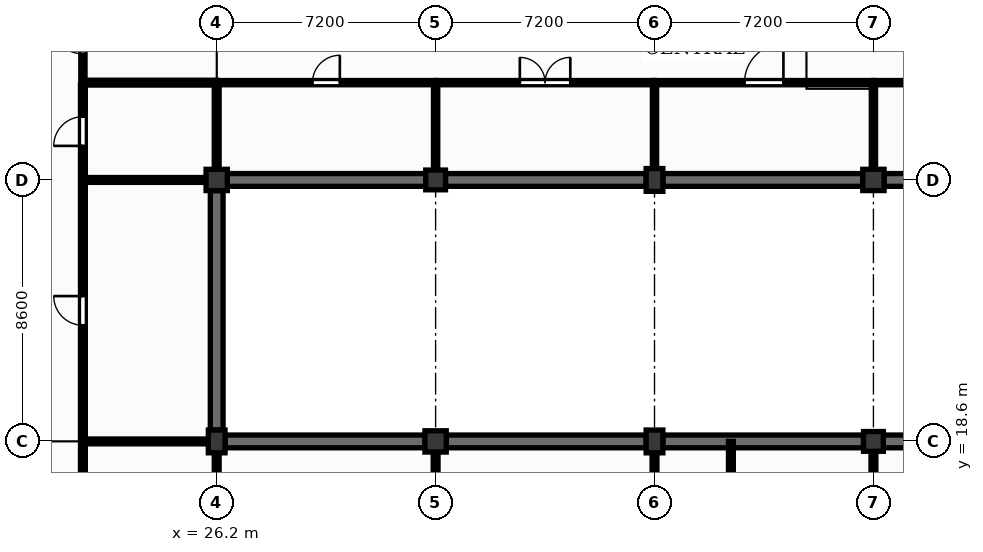
"""IFC4 building model, lengths in metres.
Left out: names, types, materials, properties, quantities, classifications, styles, units other than length and angle.
Written with IfcOpenShell. Run it as: python <this file> out.ifc"""

import sys

from ifc_helpers import new_model, si_unit, direction, frame, frame_2d, origin, origin_2d, place, context, subcontext, project, spatial, rectangle, extrude, element, fill, save


model = new_model("IFC4")
c1 = context("Model", 3, precision=1e-05, world=origin(), true_north=direction((0.0, 1.0)))
c2 = subcontext(c1, "Body", "Model", "MODEL_VIEW")
j1 = project(units=[si_unit("LENGTHUNIT", "METRE"), si_unit("PLANEANGLEUNIT", "RADIAN")], contexts=[c1])
p1 = place(None, origin())
s1 = spatial("IfcSite", under=j1, at=p1, CompositionType="ELEMENT")
p2 = place(p1, origin())
s2 = spatial("IfcBuilding", under=s1, at=p2, CompositionType="ELEMENT")
p3 = place(p2, frame((0.0, 0.0, -4.5)))
s3 = spatial("IfcBuildingStorey", under=s2, at=p3, CompositionType="ELEMENT", Elevation=-4.5)
p4 = place(p3, frame((26.2, 18.6, 0.0), z_axis=(0.0, 0.0, 1.0), x_axis=(1.0, 0.0, 0.0)))
e1 = element("IfcColumn", 1, at=p4, inside=s3, PredefinedType="COLUMN", context=c2, shape_type="SweptSolid", body=[
    extrude(rectangle(XDim=0.55, YDim=0.75, at=origin_2d()), origin(), (0.0, 0.0, 1.0), 4.2),
])
for number, where, z_axis, x_axis in (
    (2, (26.2, 27.2, 0.0), (0.0, 0.0, 1.0), (1.0, 0.0, 0.0)),
    (3, (33.4, 18.6, 0.0), (0.0, 0.0, 1.0), (1.0, 0.0, 0.0)),
):
    element("IfcColumn", number, at=place(p3, frame(where, z_axis=z_axis, x_axis=x_axis)), inside=s3, PredefinedType="COLUMN", context=c2, shape_type="SweptSolid", body=[
        extrude(rectangle(XDim=0.7, YDim=0.7, at=origin_2d()), origin(), (0.0, 0.0, 1.0), 4.2),
    ])
p5 = place(p3, frame((33.4, 27.2, 0.0), z_axis=(0.0, 0.0, 1.0), x_axis=(1.0, 0.0, 0.0)))
e4 = element("IfcColumn", 4, at=p5, inside=s3, PredefinedType="COLUMN", context=c2, shape_type="SweptSolid", body=[
    extrude(rectangle(XDim=0.65, YDim=0.65, at=origin_2d()), origin(), (0.0, 0.0, 1.0), 4.2),
])
for number, where, z_axis, x_axis in (
    (5, (40.6, 18.6, 0.0), (0.0, 0.0, 1.0), (1.0, 0.0, 0.0)),
    (6, (40.6, 27.2, 0.0), (0.0, 0.0, 1.0), (1.0, 0.0, 0.0)),
):
    element("IfcColumn", number, at=place(p3, frame(where, z_axis=z_axis, x_axis=x_axis)), inside=s3, PredefinedType="COLUMN", context=c2, shape_type="SweptSolid", body=[
        extrude(rectangle(XDim=0.55, YDim=0.75, at=origin_2d()), origin(), (0.0, 0.0, 1.0), 4.2),
    ])
p6 = place(p3, frame((47.8, 18.6, 0.0), z_axis=(0.0, 0.0, 1.0), x_axis=(1.0, 0.0, 0.0)))
e7 = element("IfcColumn", 7, at=p6, inside=s3, PredefinedType="COLUMN", context=c2, shape_type="SweptSolid", body=[
    extrude(rectangle(XDim=0.65, YDim=0.65, at=origin_2d()), origin(), (0.0, 0.0, 1.0), 4.2),
])
p7 = place(p3, frame((47.8, 27.2, 0.0), z_axis=(0.0, 0.0, 1.0), x_axis=(1.0, 0.0, 0.0)))
e8 = element("IfcColumn", 8, at=p7, inside=s3, PredefinedType="COLUMN", context=c2, shape_type="SweptSolid", body=[
    extrude(rectangle(XDim=0.7, YDim=0.7, at=origin_2d()), origin(), (0.0, 0.0, 1.0), 4.2),
])
p8 = place(p3, frame((26.2, 18.975, 0.0), z_axis=(0.0, 0.0, 1.0), x_axis=(0.0, 1.0, 0.0)))
e9 = element("IfcWall", 9, at=p8, inside=s3, PredefinedType="USERDEFINED", context=c2, shape_type="SweptSolid", body=[
    extrude(rectangle(XDim=7.875, YDim=0.42, at=frame_2d((3.938, 0.0))), origin(), (0.0, 0.0, 1.0), 4.2),
])
p9 = place(p3, frame((26.475, 18.6, 0.0), z_axis=(0.0, 0.0, 1.0), x_axis=(1.0, 0.0, 0.0)))
e10 = element("IfcWall", 10, at=p9, inside=s3, PredefinedType="USERDEFINED", context=c2, shape_type="SweptSolid", body=[
    extrude(rectangle(XDim=6.575, YDim=0.42, at=frame_2d((3.288, 0.0))), origin(), (0.0, 0.0, 1.0), 4.2),
])
p10 = place(p3, frame((26.55, 27.2, 0.0), z_axis=(0.0, 0.0, 1.0), x_axis=(1.0, 0.0, 0.0)))
e11 = element("IfcWall", 11, at=p10, inside=s3, PredefinedType="USERDEFINED", context=c2, shape_type="SweptSolid", body=[
    extrude(rectangle(XDim=6.525, YDim=0.42, at=frame_2d((3.262, 0.0))), origin(), (0.0, 0.0, 1.0), 4.2),
])
p11 = place(p3, frame((33.75, 18.6, 0.0), z_axis=(0.0, 0.0, 1.0), x_axis=(1.0, 0.0, 0.0)))
e12 = element("IfcWall", 12, at=p11, inside=s3, PredefinedType="USERDEFINED", context=c2, shape_type="SweptSolid", body=[
    extrude(rectangle(XDim=6.575, YDim=0.42, at=frame_2d((3.288, 0.0))), origin(), (0.0, 0.0, 1.0), 4.2),
])
p12 = place(p3, frame((33.725, 27.2, 0.0), z_axis=(0.0, 0.0, 1.0), x_axis=(1.0, 0.0, 0.0)))
e13 = element("IfcWall", 13, at=p12, inside=s3, PredefinedType="USERDEFINED", context=c2, shape_type="SweptSolid", body=[
    extrude(rectangle(XDim=6.6, YDim=0.42, at=frame_2d((3.3, 0.0))), origin(), (0.0, 0.0, 1.0), 4.2),
])
p13 = place(p3, frame((40.875, 18.6, 0.0), z_axis=(0.0, 0.0, 1.0), x_axis=(1.0, 0.0, 0.0)))
e14 = element("IfcWall", 14, at=p13, inside=s3, PredefinedType="USERDEFINED", context=c2, shape_type="SweptSolid", body=[
    extrude(rectangle(XDim=6.6, YDim=0.42, at=frame_2d((3.3, 0.0))), origin(), (0.0, 0.0, 1.0), 4.2),
])
p14 = place(p3, frame((40.875, 27.2, 0.0), z_axis=(0.0, 0.0, 1.0), x_axis=(1.0, 0.0, 0.0)))
e15 = element("IfcWall", 15, at=p14, inside=s3, PredefinedType="USERDEFINED", context=c2, shape_type="SweptSolid", body=[
    extrude(rectangle(XDim=6.575, YDim=0.42, at=frame_2d((3.288, 0.0))), origin(), (0.0, 0.0, 1.0), 4.2),
])
p15 = place(p3, frame((48.125, 18.6, 0.0), z_axis=(0.0, 0.0, 1.0), x_axis=(1.0, 0.0, 0.0)))
e16 = element("IfcWall", 16, at=p15, inside=s3, PredefinedType="USERDEFINED", context=c2, shape_type="SweptSolid", body=[
    extrude(rectangle(XDim=6.525, YDim=0.42, at=frame_2d((3.262, 0.0))), origin(), (0.0, 0.0, 1.0), 4.2),
])
p16 = place(p3, frame((48.15, 27.2, 0.0), z_axis=(0.0, 0.0, 1.0), x_axis=(1.0, 0.0, 0.0)))
e17 = element("IfcWall", 17, at=p16, inside=s3, PredefinedType="USERDEFINED", context=c2, shape_type="SweptSolid", body=[
    extrude(rectangle(XDim=6.575, YDim=0.42, at=frame_2d((3.288, 0.0))), origin(), (0.0, 0.0, 1.0), 4.2),
])
p17 = place(p3, frame((21.8, 13.47, 0.0), z_axis=(0.0, 0.0, 1.0), x_axis=(0.0, 1.0, 0.0)))
e18 = element("IfcWall", 18, at=p17, inside=s3, PredefinedType="PARTITIONING", context=c2, shape_type="SweptSolid", body=[
    extrude(rectangle(XDim=5.06, YDim=0.16, at=frame_2d((2.53, 0.0))), origin(), (0.0, 0.0, 1.0), 4.08),
])
p18 = place(p17, frame((2.05, 0.0, 0.0)))
e19 = element("IfcOpeningElement", 19, at=p18, cuts=e18, PredefinedType="OPENING", context=c2, shape_type="SweptSolid", body=[
    extrude(rectangle(XDim=0.96, YDim=2.1, at=frame_2d((0.48, 1.05))), frame((0.0, 0.09, 0.0), z_axis=(0.0, -1.0, 0.0), x_axis=(1.0, 0.0, 0.0)), (0.0, 0.0, 1.0), 0.18),
])
p19 = place(p3, frame((21.8, 18.67, 0.0), z_axis=(0.0, 0.0, 1.0), x_axis=(0.0, 1.0, 0.0)))
e20 = element("IfcWall", 20, at=p19, inside=s3, PredefinedType="PARTITIONING", context=c2, shape_type="SweptSolid", body=[
    extrude(rectangle(XDim=8.46, YDim=0.16, at=frame_2d((4.23, 0.0))), origin(), (0.0, 0.0, 1.0), 4.08),
])
p20 = place(p19, frame((3.75, 0.0, 0.0)))
e21 = element("IfcOpeningElement", 21, at=p20, cuts=e20, PredefinedType="OPENING", context=c2, shape_type="SweptSolid", body=[
    extrude(rectangle(XDim=0.96, YDim=2.1, at=frame_2d((0.48, 1.05))), frame((0.0, 0.09, 0.0), z_axis=(0.0, -1.0, 0.0), x_axis=(1.0, 0.0, 0.0)), (0.0, 0.0, 1.0), 0.18),
])
p21 = place(p3, frame((21.8, 18.6, 0.0), z_axis=(0.0, 0.0, 1.0), x_axis=(1.0, 0.0, 0.0)))
e22 = element("IfcWall", 22, at=p21, inside=s3, PredefinedType="PARTITIONING", context=c2, shape_type="SweptSolid", body=[
    extrude(rectangle(XDim=4.125, YDim=0.16, at=frame_2d((2.062, 0.0))), origin(), (0.0, 0.0, 1.0), 3.5),
])
p22 = place(p3, frame((21.8, 27.27, 0.0), z_axis=(0.0, 0.0, 1.0), x_axis=(0.0, 1.0, 0.0)))
e23 = element("IfcWall", 23, at=p22, inside=s3, PredefinedType="PARTITIONING", context=c2, shape_type="SweptSolid", body=[
    extrude(rectangle(XDim=3.06, YDim=0.16, at=frame_2d((1.53, 0.0))), origin(), (0.0, 0.0, 1.0), 4.08),
])
p23 = place(p22, frame((1.05, 0.0, 0.0)))
e24 = element("IfcOpeningElement", 24, at=p23, cuts=e23, PredefinedType="OPENING", context=c2, shape_type="SweptSolid", body=[
    extrude(rectangle(XDim=0.96, YDim=2.1, at=frame_2d((0.48, 1.05))), frame((0.0, 0.09, 0.0), z_axis=(0.0, -1.0, 0.0), x_axis=(1.0, 0.0, 0.0)), (0.0, 0.0, 1.0), 0.18),
])
p24 = place(p3, frame((21.8, 27.2, 0.0), z_axis=(0.0, 0.0, 1.0), x_axis=(1.0, 0.0, 0.0)))
e25 = element("IfcWall", 25, at=p24, inside=s3, PredefinedType="PARTITIONING", context=c2, shape_type="SweptSolid", body=[
    extrude(rectangle(XDim=4.05, YDim=0.16, at=frame_2d((2.025, 0.0))), origin(), (0.0, 0.0, 1.0), 3.6),
])
p25 = place(p3, frame((21.8, 30.47, 0.0), z_axis=(0.0, 0.0, 1.0), x_axis=(0.0, 1.0, 0.0)))
e26 = element("IfcWall", 26, at=p25, inside=s3, PredefinedType="PARTITIONING", context=c2, shape_type="SweptSolid", body=[
    extrude(rectangle(XDim=2.86, YDim=0.14, at=frame_2d((1.43, 0.0))), origin(), (0.0, 0.0, 1.0), 4.08),
])
p26 = place(p25, frame((0.88, 0.0, 0.0)))
e27 = element("IfcOpeningElement", 27, at=p26, cuts=e26, PredefinedType="OPENING", context=c2, shape_type="SweptSolid", body=[
    extrude(rectangle(XDim=1.1, YDim=2.1, at=frame_2d((0.55, 1.05))), frame((0.0, 0.08, 0.0), z_axis=(0.0, -1.0, 0.0), x_axis=(1.0, 0.0, 0.0)), (0.0, 0.0, 1.0), 0.16),
])
p27 = place(p3, frame((21.8, 30.4, 0.0), z_axis=(0.0, 0.0, 1.0), x_axis=(1.0, 0.0, 0.0)))
e28 = element("IfcWall", 28, at=p27, inside=s3, PredefinedType="PARTITIONING", context=c2, shape_type="SweptSolid", body=[
    extrude(rectangle(XDim=4.4, YDim=0.16, at=frame_2d((2.2, 0.0))), origin(), (0.0, 0.0, 1.0), 4.08),
])
p28 = place(p3, frame((26.2, 13.47, 0.0), z_axis=(0.0, 0.0, 1.0), x_axis=(0.0, 1.0, 0.0)))
e29 = element("IfcWall", 29, at=p28, inside=s3, PredefinedType="PARTITIONING", context=c2, shape_type="SweptSolid", body=[
    extrude(rectangle(XDim=4.755, YDim=0.16, at=frame_2d((2.377, 0.0))), origin(), (0.0, 0.0, 1.0), 3.5),
])
p29 = place(p3, frame((26.2, 27.55, 0.0), z_axis=(0.0, 0.0, 1.0), x_axis=(0.0, 1.0, 0.0)))
e30 = element("IfcWall", 30, at=p29, inside=s3, PredefinedType="PARTITIONING", context=c2, shape_type="SweptSolid", body=[
    extrude(rectangle(XDim=2.78, YDim=0.16, at=frame_2d((1.39, 0.0))), origin(), (0.0, 0.0, 1.0), 3.4),
])
p30 = place(p3, frame((26.2, 30.4, 0.0), z_axis=(0.0, 0.0, 1.0), x_axis=(1.0, 0.0, 0.0)))
e31 = element("IfcWall", 31, at=p30, inside=s3, PredefinedType="PARTITIONING", context=c2, shape_type="SweptSolid", body=[
    extrude(rectangle(XDim=7.2, YDim=0.14, at=frame_2d((3.6, 0.0))), origin(), (0.0, 0.0, 1.0), 4.08),
])
p31 = place(p30, frame((3.15, 0.0, 0.0)))
e32 = element("IfcOpeningElement", 32, at=p31, cuts=e31, PredefinedType="OPENING", context=c2, shape_type="SweptSolid", body=[
    extrude(rectangle(XDim=0.9, YDim=2.1, at=frame_2d((0.45, 1.05))), frame((0.0, 0.08, 0.0), z_axis=(0.0, -1.0, 0.0), x_axis=(1.0, 0.0, 0.0)), (0.0, 0.0, 1.0), 0.16),
])
p32 = place(p3, frame((33.4, 13.47, 0.0), z_axis=(0.0, 0.0, 1.0), x_axis=(0.0, 1.0, 0.0)))
e33 = element("IfcWall", 33, at=p32, inside=s3, PredefinedType="PARTITIONING", context=c2, shape_type="SweptSolid", body=[
    extrude(rectangle(XDim=4.78, YDim=0.16, at=frame_2d((2.39, 0.0))), origin(), (0.0, 0.0, 1.0), 3.5),
])
p33 = place(p3, frame((33.4, 27.525, 0.0), z_axis=(0.0, 0.0, 1.0), x_axis=(0.0, 1.0, 0.0)))
e34 = element("IfcWall", 34, at=p33, inside=s3, PredefinedType="PARTITIONING", context=c2, shape_type="SweptSolid", body=[
    extrude(rectangle(XDim=2.805, YDim=0.14, at=frame_2d((1.403, 0.0))), origin(), (0.0, 0.0, 1.0), 3.4),
])
p34 = place(p3, frame((33.4, 30.4, 0.0), z_axis=(0.0, 0.0, 1.0), x_axis=(1.0, 0.0, 0.0)))
e35 = element("IfcWall", 35, at=p34, inside=s3, PredefinedType="PARTITIONING", context=c2, shape_type="SweptSolid", body=[
    extrude(rectangle(XDim=7.2, YDim=0.14, at=frame_2d((3.6, 0.0))), origin(), (0.0, 0.0, 1.0), 4.08),
])
p35 = place(p34, frame((2.77, 0.0, 0.0)))
e36 = element("IfcOpeningElement", 36, at=p35, cuts=e35, PredefinedType="OPENING", context=c2, shape_type="SweptSolid", body=[
    extrude(rectangle(XDim=1.66, YDim=2.3, at=frame_2d((0.83, 1.15))), frame((0.0, 0.08, 0.0), z_axis=(0.0, -1.0, 0.0), x_axis=(1.0, 0.0, 0.0)), (0.0, 0.0, 1.0), 0.16),
])
p36 = place(p3, frame((40.6, 13.47, 0.0), z_axis=(0.0, 0.0, 1.0), x_axis=(0.0, 1.0, 0.0)))
e37 = element("IfcWall", 37, at=p36, inside=s3, PredefinedType="PARTITIONING", context=c2, shape_type="SweptSolid", body=[
    extrude(rectangle(XDim=4.755, YDim=0.16, at=frame_2d((2.377, 0.0))), origin(), (0.0, 0.0, 1.0), 3.5),
])
p37 = place(p3, frame((40.6, 27.575, 0.0), z_axis=(0.0, 0.0, 1.0), x_axis=(0.0, 1.0, 0.0)))
e38 = element("IfcWall", 38, at=p37, inside=s3, PredefinedType="PARTITIONING", context=c2, shape_type="SweptSolid", body=[
    extrude(rectangle(XDim=2.755, YDim=0.14, at=frame_2d((1.377, 0.0))), origin(), (0.0, 0.0, 1.0), 3.4),
])
p38 = place(p3, frame((40.6, 30.4, 0.0), z_axis=(0.0, 0.0, 1.0), x_axis=(1.0, 0.0, 0.0)))
e39 = element("IfcWall", 39, at=p38, inside=s3, PredefinedType="PARTITIONING", context=c2, shape_type="SweptSolid", body=[
    extrude(rectangle(XDim=7.2, YDim=0.14, at=frame_2d((3.6, 0.0))), origin(), (0.0, 0.0, 1.0), 4.08),
])
p39 = place(p38, frame((2.96, 0.0, 0.0)))
e40 = element("IfcOpeningElement", 40, at=p39, cuts=e39, PredefinedType="OPENING", context=c2, shape_type="SweptSolid", body=[
    extrude(rectangle(XDim=1.28, YDim=2.2, at=frame_2d((0.64, 1.1))), frame((0.0, 0.08, 0.0), z_axis=(0.0, -1.0, 0.0), x_axis=(1.0, 0.0, 0.0)), (0.0, 0.0, 1.0), 0.16),
])
p40 = place(p3, frame((43.113, 13.47, 0.0), z_axis=(0.0, 0.0, 1.0), x_axis=(0.0, 1.0, 0.0)))
e41 = element("IfcWall", 41, at=p40, inside=s3, PredefinedType="PARTITIONING", context=c2, shape_type="SweptSolid", body=[
    extrude(rectangle(XDim=5.13, YDim=0.16, at=frame_2d((2.565, 0.0))), origin(), (0.0, 0.0, 1.0), 4.08),
])
p41 = place(p3, frame((47.8, 13.47, 0.0), z_axis=(0.0, 0.0, 1.0), x_axis=(0.0, 1.0, 0.0)))
e42 = element("IfcWall", 42, at=p41, inside=s3, PredefinedType="PARTITIONING", context=c2, shape_type="SweptSolid", body=[
    extrude(rectangle(XDim=4.805, YDim=0.16, at=frame_2d((2.402, 0.0))), origin(), (0.0, 0.0, 1.0), 3.5),
])
p42 = place(p3, frame((47.8, 27.55, 0.0), z_axis=(0.0, 0.0, 1.0), x_axis=(0.0, 1.0, 0.0)))
e43 = element("IfcWall", 43, at=p42, inside=s3, PredefinedType="PARTITIONING", context=c2, shape_type="SweptSolid", body=[
    extrude(rectangle(XDim=2.78, YDim=0.14, at=frame_2d((1.39, 0.0))), origin(), (0.0, 0.0, 1.0), 3.4),
])
p43 = place(p3, frame((47.8, 30.4, 0.0), z_axis=(0.0, 0.0, 1.0), x_axis=(1.0, 0.0, 0.0)))
e44 = element("IfcWall", 44, at=p43, inside=s3, PredefinedType="PARTITIONING", context=c2, shape_type="SweptSolid", body=[
    extrude(rectangle(XDim=7.2, YDim=0.14, at=frame_2d((3.6, 0.0))), origin(), (0.0, 0.0, 1.0), 4.08),
])
p44 = place(p43, frame((3.05, 0.0, 0.0)))
e45 = element("IfcOpeningElement", 45, at=p44, cuts=e44, PredefinedType="OPENING", context=c2, shape_type="SweptSolid", body=[
    extrude(rectangle(XDim=1.1, YDim=2.1, at=frame_2d((0.55, 1.05))), frame((0.0, 0.08, 0.0), z_axis=(0.0, -1.0, 0.0), x_axis=(1.0, 0.0, 0.0)), (0.0, 0.0, 1.0), 0.16),
])
p45 = place(p26, origin())
e46 = element("IfcDoor", 46, at=p45, inside=s3, OperationType="SINGLE_SWING_RIGHT", PredefinedType="DOOR", context=c2, shape_type="SweptSolid", body=[
    extrude(rectangle(XDim=1.1, YDim=2.1, at=frame_2d((0.55, 1.05))), frame((0.0, 0.025, 0.0), z_axis=(0.0, -1.0, 0.0), x_axis=(1.0, 0.0, 0.0)), (0.0, 0.0, 1.0), 0.05),
])
fill(e27, e46)
p46 = place(p31, origin())
e47 = element("IfcDoor", 47, at=p46, inside=s3, OperationType="SINGLE_SWING_RIGHT", PredefinedType="DOOR", context=c2, shape_type="SweptSolid", body=[
    extrude(rectangle(XDim=0.9, YDim=2.1, at=frame_2d((0.45, 1.05))), frame((0.0, 0.025, 0.0), z_axis=(0.0, -1.0, 0.0), x_axis=(1.0, 0.0, 0.0)), (0.0, 0.0, 1.0), 0.05),
])
fill(e32, e47)
p47 = place(p35, origin())
e48 = element("IfcDoor", 48, at=p47, inside=s3, OperationType="DOUBLE_DOOR_SINGLE_SWING", PredefinedType="DOOR", context=c2, shape_type="SweptSolid", body=[
    extrude(rectangle(XDim=1.66, YDim=2.3, at=frame_2d((0.83, 1.15))), frame((0.0, 0.025, 0.0), z_axis=(0.0, -1.0, 0.0), x_axis=(1.0, 0.0, 0.0)), (0.0, 0.0, 1.0), 0.05),
])
fill(e36, e48)
p48 = place(p39, origin())
e49 = element("IfcDoor", 49, at=p48, inside=s3, OperationType="SINGLE_SWING_RIGHT", PredefinedType="DOOR", context=c2, shape_type="SweptSolid", body=[
    extrude(rectangle(XDim=1.28, YDim=2.2, at=frame_2d((0.64, 1.1))), frame((0.0, 0.025, 0.0), z_axis=(0.0, -1.0, 0.0), x_axis=(1.0, 0.0, 0.0)), (0.0, 0.0, 1.0), 0.05),
])
fill(e40, e49)
p49 = place(p20, origin())
e50 = element("IfcDoor", 50, at=p49, inside=s3, OperationType="SINGLE_SWING_RIGHT", PredefinedType="DOOR", context=c2, shape_type="SweptSolid", body=[
    extrude(rectangle(XDim=0.96, YDim=2.1, at=frame_2d((0.48, 1.05))), frame((0.0, 0.025, 0.0), z_axis=(0.0, -1.0, 0.0), x_axis=(1.0, 0.0, 0.0)), (0.0, 0.0, 1.0), 0.05),
])
fill(e21, e50)
p50 = place(p23, origin())
e51 = element("IfcDoor", 51, at=p50, inside=s3, OperationType="SINGLE_SWING_LEFT", PredefinedType="DOOR", context=c2, shape_type="SweptSolid", body=[
    extrude(rectangle(XDim=0.96, YDim=2.1, at=frame_2d((0.48, 1.05))), frame((0.0, 0.025, 0.0), z_axis=(0.0, -1.0, 0.0), x_axis=(1.0, 0.0, 0.0)), (0.0, 0.0, 1.0), 0.05),
])
fill(e24, e51)
save(model, sys.argv[1])
